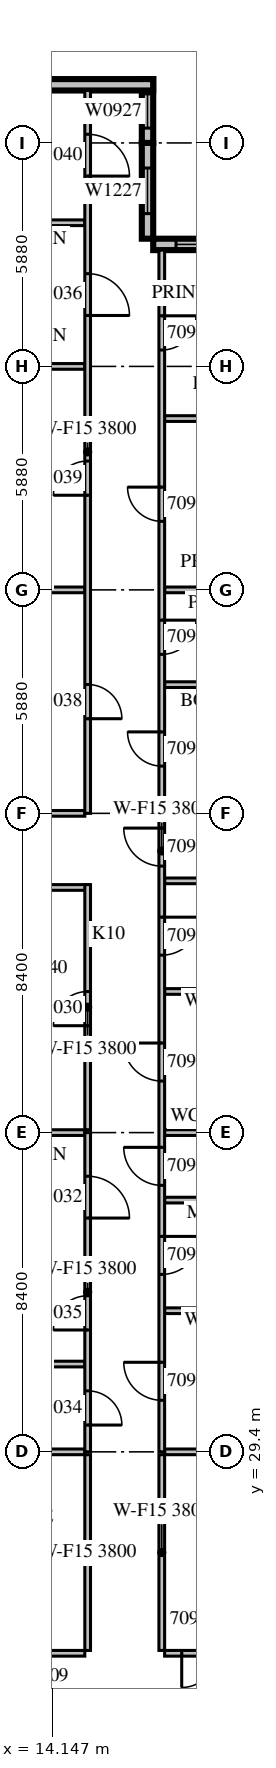
"""IFC4 building model, lengths in metres.
Left out: names, types, materials, properties, quantities, classifications, styles, units other than length and angle.
Written with IfcOpenShell. Run it as: python <this file> out.ifc"""

import sys

from ifc_helpers import new_model, si_unit, direction, frame, frame_2d, origin, place, context, subcontext, project, spatial, rectangle, extrude, source, transform, mapped, element, fill, save


model = new_model("IFC4")
c1 = context("Model", 3, precision=1e-05, world=origin(), true_north=direction((0.0, 1.0)))
c2 = subcontext(c1, "Body", "Model", "MODEL_VIEW")
j1 = project(units=[si_unit("LENGTHUNIT", "METRE"), si_unit("PLANEANGLEUNIT", "RADIAN")], contexts=[c1])
p1 = place(None, origin())
s1 = spatial("IfcSite", under=j1, at=p1, CompositionType="ELEMENT")
p2 = place(p1, origin())
s2 = spatial("IfcBuilding", under=s1, at=p2, CompositionType="ELEMENT")
p3 = place(p2, frame((0.0, 0.0, 48.9)))
s3 = spatial("IfcBuildingStorey", under=s2, at=p3, CompositionType="ELEMENT", Elevation=48.9)
m1 = source(origin(), c2, "Body", "SweptSolid", [
    extrude(rectangle(XDim=4.2, YDim=0.3, at=frame_2d((2.1, 0.0))), origin(), (0.0, 0.0, 1.0), 3.8),
])
p4 = place(p3, frame((21.0, 61.17, 0.0), z_axis=(0.0, 0.0, 1.0), x_axis=(-1.0, 0.0, 0.0)))
e1 = element("IfcWall", 1, at=p4, inside=s3, PredefinedType="STANDARD", context=c2, shape_type="MappedRepresentation", body=[
    mapped(m1, transform((0.0, 0.0, 0.0), scale=1.0)),
])
m2 = source(origin(), c2, "Body", "SweptSolid", [
    extrude(rectangle(XDim=3.0, YDim=2.7, at=frame_2d((1.5, 1.35))), frame((0.0, 0.16, 0.0), z_axis=(0.0, -1.0, 0.0), x_axis=(1.0, 0.0, 0.0)), (0.0, 0.0, 1.0), 0.32),
])
p5 = place(p4, frame((0.6, 0.0, 0.6)))
e2 = element("IfcOpeningElement", 2, at=p5, cuts=e1, PredefinedType="OPENING", context=c2, shape_type="MappedRepresentation", body=[
    mapped(m2, transform((0.0, 0.0, 0.0), scale=1.0)),
])
m3 = source(origin(), c2, "Body", "SweptSolid", [
    extrude(rectangle(XDim=2.52, YDim=0.3, at=frame_2d((1.26, 0.0))), origin(), (0.0, 0.0, 1.0), 3.8),
])
p6 = place(p3, frame((16.65, 61.32, 0.0), z_axis=(0.0, 0.0, 1.0), x_axis=(0.0, 1.0, 0.0)))
e3 = element("IfcWall", 3, at=p6, inside=s3, PredefinedType="STANDARD", context=c2, shape_type="MappedRepresentation", body=[
    mapped(m3, transform((0.0, 0.0, 0.0), scale=1.0)),
])
m4 = source(origin(), c2, "Body", "SweptSolid", [
    extrude(rectangle(XDim=1.2, YDim=2.7, at=frame_2d((0.6, 1.35))), frame((0.0, 0.16, 0.0), z_axis=(0.0, -1.0, 0.0), x_axis=(1.0, 0.0, 0.0)), (0.0, 0.0, 1.0), 0.32),
])
p7 = place(p6, frame((0.66, 0.0, 0.6)))
e4 = element("IfcOpeningElement", 4, at=p7, cuts=e3, PredefinedType="OPENING", context=c2, shape_type="MappedRepresentation", body=[
    mapped(m4, transform((0.0, 0.0, 0.0), scale=1.0)),
])
m5 = source(origin(), c2, "Body", "SweptSolid", [
    extrude(rectangle(XDim=1.68, YDim=0.3, at=frame_2d((0.84, 0.0))), origin(), (0.0, 0.0, 1.0), 3.8),
])
p8 = place(p3, frame((16.65, 63.84, 0.0), z_axis=(0.0, 0.0, 1.0), x_axis=(0.0, 1.0, 0.0)))
e5 = element("IfcWall", 5, at=p8, inside=s3, PredefinedType="STANDARD", context=c2, shape_type="MappedRepresentation", body=[
    mapped(m5, transform((0.0, 0.0, 0.0), scale=1.0)),
])
m6 = source(origin(), c2, "Body", "SweptSolid", [
    extrude(rectangle(XDim=0.9, YDim=2.7, at=frame_2d((0.45, 1.35))), frame((0.0, 0.16, 0.0), z_axis=(0.0, -1.0, 0.0), x_axis=(1.0, 0.0, 0.0)), (0.0, 0.0, 1.0), 0.32),
])
p9 = place(p8, frame((0.39, 0.0, 0.6)))
e6 = element("IfcOpeningElement", 6, at=p9, cuts=e5, PredefinedType="OPENING", context=c2, shape_type="MappedRepresentation", body=[
    mapped(m6, transform((0.0, 0.0, 0.0), scale=1.0)),
])
m7 = source(origin(), c2, "Body", "SweptSolid", [
    extrude(rectangle(XDim=3.15, YDim=0.3, at=frame_2d((1.575, 0.0))), origin(), (0.0, 0.0, 1.0), 3.8),
])
p10 = place(p3, frame((16.8, 65.37, 0.0), z_axis=(0.0, 0.0, 1.0), x_axis=(-1.0, 0.0, 0.0)))
e7 = element("IfcWall", 7, at=p10, inside=s3, PredefinedType="STANDARD", context=c2, shape_type="MappedRepresentation", body=[
    mapped(m7, transform((0.0, 0.0, 0.0), scale=1.0)),
])
m8 = source(origin(), c2, "Body", "SweptSolid", [
    extrude(rectangle(XDim=11.925, YDim=0.15, at=frame_2d((5.963, 0.0))), origin(), (0.0, 0.0, 1.0), 3.8),
])
p11 = place(p3, frame((3.075, 24.1, 0.0), z_axis=(0.0, 0.0, 1.0), x_axis=(1.0, 0.0, 0.0)))
e8 = element("IfcWall", 8, at=p11, inside=s3, PredefinedType="PARTITIONING", context=c2, shape_type="MappedRepresentation", body=[
    mapped(m8, transform((0.0, 0.0, 0.0), scale=1.0)),
])
m9 = source(origin(), c2, "Body", "SweptSolid", [
    extrude(rectangle(XDim=0.9, YDim=2.1, at=frame_2d((0.45, 1.05))), frame((0.0, 0.085, 0.0), z_axis=(0.0, -1.0, 0.0), x_axis=(1.0, 0.0, 0.0)), (0.0, 0.0, 1.0), 0.17),
])
p12 = place(p11, frame((1.462, 0.0, 0.0)))
e9 = element("IfcOpeningElement", 9, at=p12, cuts=e8, PredefinedType="OPENING", context=c2, shape_type="MappedRepresentation", body=[
    mapped(m9, transform((0.0, 0.0, 0.0), scale=1.0)),
])
p13 = place(p11, frame((8.3, 0.0, 0.0)))
e10 = element("IfcOpeningElement", 10, at=p13, cuts=e8, PredefinedType="OPENING", context=c2, shape_type="MappedRepresentation", body=[
    mapped(m9, transform((0.0, 0.0, 0.0), scale=1.0)),
])
m10 = source(origin(), c2, "Body", "SweptSolid", [
    extrude(rectangle(XDim=3.6, YDim=0.15, at=frame_2d((1.8, 0.0))), origin(), (0.0, 0.0, 1.0), 3.8),
])
p14 = place(p3, frame((17.1, 24.1, 0.0), z_axis=(0.0, 0.0, 1.0), x_axis=(1.0, 0.0, 0.0)))
e11 = element("IfcWall", 11, at=p14, inside=s3, PredefinedType="PARTITIONING", context=c2, shape_type="MappedRepresentation", body=[
    mapped(m10, transform((0.0, 0.0, 0.0), scale=1.0)),
])
p15 = place(p14, frame((0.45, 0.0, 0.0)))
e12 = element("IfcOpeningElement", 12, at=p15, cuts=e11, PredefinedType="OPENING", context=c2, shape_type="MappedRepresentation", body=[
    mapped(m9, transform((0.0, 0.0, 0.0), scale=1.0)),
])
m11 = source(origin(), c2, "Body", "SweptSolid", [
    extrude(rectangle(XDim=5.15, YDim=0.15, at=frame_2d((2.575, 0.0))), origin(), (0.0, 0.0, 1.0), 3.8),
])
for number, where, z_axis, x_axis in (
    (13, (15.075, 24.175, 0.0), (0.0, 0.0, 1.0), (0.0, 1.0, 0.0)),
    (14, (17.025, 29.325, 0.0), (0.0, 0.0, 1.0), (0.0, -1.0, 0.0)),
):
    element("IfcWall", number, at=place(p3, frame(where, z_axis=z_axis, x_axis=x_axis)), inside=s3, PredefinedType="PARTITIONING", context=c2, shape_type="MappedRepresentation", body=[
        mapped(m11, transform((0.0, 0.0, 0.0), scale=1.0)),
    ])
m12 = source(origin(), c2, "Body", "SweptSolid", [
    extrude(rectangle(XDim=3.901, YDim=0.15, at=frame_2d((1.95, 0.0))), origin(), (0.0, 0.0, 1.0), 3.8),
])
p16 = place(p3, frame((15.0, 29.4, 0.0), z_axis=(0.0, 0.0, 1.0), x_axis=(-1.0, 0.0, 0.0)))
e15 = element("IfcWall", 15, at=p16, inside=s3, PredefinedType="PARTITIONING", context=c2, shape_type="MappedRepresentation", body=[
    mapped(m12, transform((0.0, 0.0, 0.0), scale=1.0)),
])
m13 = source(origin(), c2, "Body", "SweptSolid", [
    extrude(rectangle(XDim=2.701, YDim=0.15, at=frame_2d((1.351, 0.0))), origin(), (0.0, 0.0, 1.0), 3.8),
])
p17 = place(p3, frame((19.801, 29.4, 0.0), z_axis=(0.0, 0.0, 1.0), x_axis=(-1.0, 0.0, 0.0)))
e16 = element("IfcWall", 16, at=p17, inside=s3, PredefinedType="PARTITIONING", context=c2, shape_type="MappedRepresentation", body=[
    mapped(m13, transform((0.0, 0.0, 0.0), scale=1.0)),
])
p18 = place(p3, frame((15.075, 44.25, 0.0), z_axis=(0.0, 0.0, 1.0), x_axis=(-1.0, 0.0, 0.0)))
e17 = element("IfcWall", 17, at=p18, inside=s3, PredefinedType="PARTITIONING", context=c2, shape_type="SweptSolid", body=[
    extrude(rectangle(XDim=3.175, YDim=0.15, at=frame_2d((1.587, 0.0))), origin(), (0.0, 0.0, 1.0), 3.8),
])
m14 = source(origin(), c2, "Body", "SweptSolid", [
    extrude(rectangle(XDim=6.45, YDim=0.15, at=frame_2d((3.225, 0.0))), origin(), (0.0, 0.0, 1.0), 3.8),
])
p19 = place(p3, frame((15.075, 37.875, 0.0), z_axis=(0.0, 0.0, 1.0), x_axis=(0.0, 1.0, 0.0)))
e18 = element("IfcWall", 18, at=p19, inside=s3, PredefinedType="PARTITIONING", context=c2, shape_type="MappedRepresentation", body=[
    mapped(m14, transform((0.0, 0.0, 0.0), scale=1.0)),
])
p20 = place(p19, frame((2.737, 0.0, 0.0)))
e19 = element("IfcOpeningElement", 19, at=p20, cuts=e18, PredefinedType="OPENING", context=c2, shape_type="MappedRepresentation", body=[
    mapped(m9, transform((0.0, 0.0, 0.0), scale=1.0)),
])
m15 = source(origin(), c2, "Body", "SweptSolid", [
    extrude(rectangle(XDim=3.75, YDim=0.15, at=frame_2d((1.875, 0.0))), origin(), (0.0, 0.0, 1.0), 3.8),
])
for number, where, z_axis, x_axis in (
    (20, (15.0, 31.71, 0.0), (0.0, 0.0, 1.0), (-1.0, 0.0, 0.0)),
    (21, (15.0, 34.403, 0.0), (0.0, 0.0, 1.0), (-1.0, 0.0, 0.0)),
    (22, (15.0, 37.8, 0.0), (0.0, 0.0, 1.0), (-1.0, 0.0, 0.0)),
    (23, (15.0, 52.08, 0.0), (0.0, 0.0, 1.0), (-1.0, 0.0, 0.0)),
    (24, (15.0, 57.96, 0.0), (0.0, 0.0, 1.0), (-1.0, 0.0, 0.0)),
    (25, (15.0, 46.2, 0.0), (0.0, 0.0, 1.0), (-1.0, 0.0, 0.0)),
    (26, (15.0, 61.74, 0.0), (0.0, 0.0, 1.0), (-1.0, 0.0, 0.0)),
):
    element("IfcWall", number, at=place(p3, frame(where, z_axis=z_axis, x_axis=x_axis)), inside=s3, PredefinedType="PARTITIONING", context=c2, shape_type="MappedRepresentation", body=[
        mapped(m15, transform((0.0, 0.0, 0.0), scale=1.0)),
    ])
for number, where, z_axis, x_axis in (
    (27, (17.1, 33.113, 0.0), (0.0, 0.0, 1.0), (1.0, 0.0, 0.0)),
    (28, (17.1, 36.024, 0.0), (0.0, 0.0, 1.0), (1.0, 0.0, 0.0)),
    (29, (17.1, 41.513, 0.0), (0.0, 0.0, 1.0), (1.0, 0.0, 0.0)),
    (30, (17.1, 44.424, 0.0), (0.0, 0.0, 1.0), (1.0, 0.0, 0.0)),
    (31, (17.1, 49.587, 0.0), (0.0, 0.0, 1.0), (1.0, 0.0, 0.0)),
    (32, (17.1, 56.587, 0.0), (0.0, 0.0, 1.0), (1.0, 0.0, 0.0)),
):
    element("IfcWall", number, at=place(p3, frame(where, z_axis=z_axis, x_axis=x_axis)), inside=s3, PredefinedType="PARTITIONING", context=c2, shape_type="MappedRepresentation", body=[
        mapped(m10, transform((0.0, 0.0, 0.0), scale=1.0)),
    ])
for number, where, z_axis, x_axis in (
    (33, (19.801, 37.8, 0.0), (0.0, 0.0, 1.0), (-1.0, 0.0, 0.0)),
    (34, (19.801, 46.2, 0.0), (0.0, 0.0, 1.0), (-1.0, 0.0, 0.0)),
    (35, (19.801, 52.08, 0.0), (0.0, 0.0, 1.0), (-1.0, 0.0, 0.0)),
):
    element("IfcWall", number, at=place(p3, frame(where, z_axis=z_axis, x_axis=x_axis)), inside=s3, PredefinedType="PARTITIONING", context=c2, shape_type="MappedRepresentation", body=[
        mapped(m13, transform((0.0, 0.0, 0.0), scale=1.0)),
    ])
m16 = source(origin(), c2, "Body", "SweptSolid", [
    extrude(rectangle(XDim=8.4, YDim=0.15, at=frame_2d((4.2, 0.0))), origin(), (0.0, 0.0, 1.0), 3.8),
])
p21 = place(p3, frame((15.075, 29.4, 0.0), z_axis=(0.0, 0.0, 1.0), x_axis=(0.0, 1.0, 0.0)))
e36 = element("IfcWall", 36, at=p21, inside=s3, PredefinedType="PARTITIONING", context=c2, shape_type="MappedRepresentation", body=[
    mapped(m16, transform((0.0, 0.0, 0.0), scale=1.0)),
])
m17 = source(origin(), c2, "Body", "SweptSolid", [
    extrude(rectangle(XDim=1.1, YDim=2.1, at=frame_2d((0.55, 1.05))), frame((0.0, 0.085, 0.0), z_axis=(0.0, -1.0, 0.0), x_axis=(1.0, 0.0, 0.0)), (0.0, 0.0, 1.0), 0.17),
])
p22 = place(p21, frame((6.152, 0.0, 0.0)))
e37 = element("IfcOpeningElement", 37, at=p22, cuts=e36, PredefinedType="OPENING", context=c2, shape_type="MappedRepresentation", body=[
    mapped(m17, transform((0.0, 0.0, 0.0), scale=1.0)),
])
p23 = place(p21, frame((0.705, 0.0, 0.0)))
e38 = element("IfcOpeningElement", 38, at=p23, cuts=e36, PredefinedType="OPENING", context=c2, shape_type="MappedRepresentation", body=[
    mapped(m9, transform((0.0, 0.0, 0.0), scale=1.0)),
])
p24 = place(p21, frame((3.207, 0.0, 0.0)))
e39 = element("IfcOpeningElement", 39, at=p24, cuts=e36, PredefinedType="OPENING", context=c2, shape_type="MappedRepresentation", body=[
    mapped(m9, transform((0.0, 0.0, 0.0), scale=1.0)),
])
m18 = source(origin(), c2, "Body", "SweptSolid", [
    extrude(rectangle(XDim=19.02, YDim=0.15, at=frame_2d((9.51, 0.0))), origin(), (0.0, 0.0, 1.0), 3.8),
])
p25 = place(p3, frame((15.075, 46.2, 0.0), z_axis=(0.0, 0.0, 1.0), x_axis=(0.0, 1.0, 0.0)))
e40 = element("IfcWall", 40, at=p25, inside=s3, PredefinedType="PARTITIONING", context=c2, shape_type="MappedRepresentation", body=[
    mapped(m18, transform((0.0, 0.0, 0.0), scale=1.0)),
])
p26 = place(p25, frame((13.1, 0.0, 0.0)))
e41 = element("IfcOpeningElement", 41, at=p26, cuts=e40, PredefinedType="OPENING", context=c2, shape_type="MappedRepresentation", body=[
    mapped(m17, transform((0.0, 0.0, 0.0), scale=1.0)),
])
p27 = place(p25, frame((2.49, 0.0, 0.0)))
e42 = element("IfcOpeningElement", 42, at=p27, cuts=e40, PredefinedType="OPENING", context=c2, shape_type="MappedRepresentation", body=[
    mapped(m9, transform((0.0, 0.0, 0.0), scale=1.0)),
])
p28 = place(p25, frame((8.37, 0.0, 0.0)))
e43 = element("IfcOpeningElement", 43, at=p28, cuts=e40, PredefinedType="OPENING", context=c2, shape_type="MappedRepresentation", body=[
    mapped(m9, transform((0.0, 0.0, 0.0), scale=1.0)),
])
p29 = place(p25, frame((16.767, 0.0, 0.0)))
e44 = element("IfcOpeningElement", 44, at=p29, cuts=e40, PredefinedType="OPENING", context=c2, shape_type="MappedRepresentation", body=[
    mapped(m17, transform((0.0, 0.0, 0.0), scale=1.0)),
])
p30 = place(p3, frame((17.025, 61.02, 0.0), z_axis=(0.0, 0.0, 1.0), x_axis=(0.0, -1.0, 0.0)))
e45 = element("IfcWall", 45, at=p30, inside=s3, PredefinedType="PARTITIONING", context=c2, shape_type="SweptSolid", body=[
    extrude(rectangle(XDim=31.62, YDim=0.15, at=frame_2d((15.81, 0.0))), origin(), (0.0, 0.0, 1.0), 3.8),
])
m19 = source(origin(), c2, "Body", "SweptSolid", [
    extrude(rectangle(XDim=1.0, YDim=2.1, at=frame_2d((0.5, 1.05))), frame((0.0, 0.085, 0.0), z_axis=(0.0, -1.0, 0.0), x_axis=(1.0, 0.0, 0.0)), (0.0, 0.0, 1.0), 0.17),
])
p31 = place(p30, frame((29.263, 0.0, 0.0)))
e46 = element("IfcOpeningElement", 46, at=p31, cuts=e45, PredefinedType="OPENING", context=c2, shape_type="MappedRepresentation", body=[
    mapped(m19, transform((0.0, 0.0, 0.0), scale=1.0)),
])
p32 = place(p30, frame((25.951, 0.0, 0.0)))
e47 = element("IfcOpeningElement", 47, at=p32, cuts=e45, PredefinedType="OPENING", context=c2, shape_type="MappedRepresentation", body=[
    mapped(m19, transform((0.0, 0.0, 0.0), scale=1.0)),
])
p33 = place(p30, frame((23.608, 0.0, 0.0)))
e48 = element("IfcOpeningElement", 48, at=p33, cuts=e45, PredefinedType="OPENING", context=c2, shape_type="MappedRepresentation", body=[
    mapped(m19, transform((0.0, 0.0, 0.0), scale=1.0)),
])
p34 = place(p30, frame((20.863, 0.0, 0.0)))
e49 = element("IfcOpeningElement", 49, at=p34, cuts=e45, PredefinedType="OPENING", context=c2, shape_type="MappedRepresentation", body=[
    mapped(m19, transform((0.0, 0.0, 0.0), scale=1.0)),
])
p35 = place(p30, frame((17.551, 0.0, 0.0)))
e50 = element("IfcOpeningElement", 50, at=p35, cuts=e45, PredefinedType="OPENING", context=c2, shape_type="MappedRepresentation", body=[
    mapped(m19, transform((0.0, 0.0, 0.0), scale=1.0)),
])
p36 = place(p30, frame((15.208, 0.0, 0.0)))
e51 = element("IfcOpeningElement", 51, at=p36, cuts=e45, PredefinedType="OPENING", context=c2, shape_type="MappedRepresentation", body=[
    mapped(m19, transform((0.0, 0.0, 0.0), scale=1.0)),
])
p37 = place(p30, frame((12.677, 0.0, 0.0)))
e52 = element("IfcOpeningElement", 52, at=p37, cuts=e45, PredefinedType="OPENING", context=c2, shape_type="MappedRepresentation", body=[
    mapped(m9, transform((0.0, 0.0, 0.0), scale=1.0)),
])
p38 = place(p30, frame((9.737, 0.0, 0.0)))
e53 = element("IfcOpeningElement", 53, at=p38, cuts=e45, PredefinedType="OPENING", context=c2, shape_type="MappedRepresentation", body=[
    mapped(m9, transform((0.0, 0.0, 0.0), scale=1.0)),
])
p39 = place(p30, frame((6.236, 0.0, 0.0)))
e54 = element("IfcOpeningElement", 54, at=p39, cuts=e45, PredefinedType="OPENING", context=c2, shape_type="MappedRepresentation", body=[
    mapped(m9, transform((0.0, 0.0, 0.0), scale=1.0)),
])
p40 = place(p30, frame((1.729, 0.0, 0.0)))
e55 = element("IfcOpeningElement", 55, at=p40, cuts=e45, PredefinedType="OPENING", context=c2, shape_type="MappedRepresentation", body=[
    mapped(m9, transform((0.0, 0.0, 0.0), scale=1.0)),
])
m20 = source(origin(), c2, "Body", "SweptSolid", [
    extrude(rectangle(XDim=3.0, YDim=2.7, at=frame_2d((1.5, 1.35))), frame((0.0, 0.03, 0.0), z_axis=(0.0, -1.0, 0.0), x_axis=(1.0, 0.0, 0.0)), (0.0, 0.0, 1.0), 0.06),
])
p41 = place(p5, origin())
e56 = element("IfcWindow", 56, at=p41, inside=s3, PartitioningType="SINGLE_PANEL", PredefinedType="WINDOW", context=c2, shape_type="MappedRepresentation", body=[
    mapped(m20, transform((0.0, 0.0, 0.0), scale=1.0)),
])
fill(e2, e56)
m21 = source(origin(), c2, "Body", "SweptSolid", [
    extrude(rectangle(XDim=1.2, YDim=2.7, at=frame_2d((0.6, 1.35))), frame((0.0, 0.03, 0.0), z_axis=(0.0, -1.0, 0.0), x_axis=(1.0, 0.0, 0.0)), (0.0, 0.0, 1.0), 0.06),
])
p42 = place(p7, origin())
e57 = element("IfcWindow", 57, at=p42, inside=s3, PartitioningType="SINGLE_PANEL", PredefinedType="WINDOW", context=c2, shape_type="MappedRepresentation", body=[
    mapped(m21, transform((0.0, 0.0, 0.0), scale=1.0)),
])
fill(e4, e57)
m22 = source(origin(), c2, "Body", "SweptSolid", [
    extrude(rectangle(XDim=0.9, YDim=2.7, at=frame_2d((0.45, 1.35))), frame((0.0, 0.03, 0.0), z_axis=(0.0, -1.0, 0.0), x_axis=(1.0, 0.0, 0.0)), (0.0, 0.0, 1.0), 0.06),
])
p43 = place(p9, origin())
e58 = element("IfcWindow", 58, at=p43, inside=s3, PartitioningType="SINGLE_PANEL", PredefinedType="WINDOW", context=c2, shape_type="MappedRepresentation", body=[
    mapped(m22, transform((0.0, 0.0, 0.0), scale=1.0)),
])
fill(e6, e58)
m23 = source(origin(), c2, "Body", "SweptSolid", [
    extrude(rectangle(XDim=0.9, YDim=2.1, at=frame_2d((0.45, 1.05))), frame((0.0, 0.025, 0.0), z_axis=(0.0, -1.0, 0.0), x_axis=(1.0, 0.0, 0.0)), (0.0, 0.0, 1.0), 0.05),
])
p44 = place(p15, origin())
e59 = element("IfcDoor", 59, at=p44, inside=s3, OperationType="SINGLE_SWING_RIGHT", PredefinedType="DOOR", context=c2, shape_type="MappedRepresentation", body=[
    mapped(m23, transform((0.0, 0.0, 0.0), scale=1.0)),
])
fill(e12, e59)
p45 = place(p20, origin())
e60 = element("IfcDoor", 60, at=p45, inside=s3, OperationType="SINGLE_SWING_LEFT", PredefinedType="DOOR", context=c2, shape_type="MappedRepresentation", body=[
    mapped(m23, transform((0.0, 0.0, 0.0), scale=1.0)),
])
fill(e19, e60)
m24 = source(origin(), c2, "Body", "SweptSolid", [
    extrude(rectangle(XDim=1.1, YDim=2.1, at=frame_2d((0.55, 1.05))), frame((0.0, 0.025, 0.0), z_axis=(0.0, -1.0, 0.0), x_axis=(1.0, 0.0, 0.0)), (0.0, 0.0, 1.0), 0.05),
])
p46 = place(p22, origin())
e61 = element("IfcDoor", 61, at=p46, inside=s3, OperationType="SINGLE_SWING_RIGHT", PredefinedType="DOOR", context=c2, shape_type="MappedRepresentation", body=[
    mapped(m24, transform((0.0, 0.0, 0.0), scale=1.0)),
])
fill(e37, e61)
p47 = place(p23, origin())
e62 = element("IfcDoor", 62, at=p47, inside=s3, OperationType="SINGLE_SWING_RIGHT", PredefinedType="DOOR", context=c2, shape_type="MappedRepresentation", body=[
    mapped(m23, transform((0.0, 0.0, 0.0), scale=1.0)),
])
fill(e38, e62)
p48 = place(p24, origin())
e63 = element("IfcDoor", 63, at=p48, inside=s3, OperationType="SINGLE_SWING_LEFT", PredefinedType="DOOR", context=c2, shape_type="MappedRepresentation", body=[
    mapped(m23, transform((0.0, 0.0, 0.0), scale=1.0)),
])
fill(e39, e63)
p49 = place(p26, origin())
e64 = element("IfcDoor", 64, at=p49, inside=s3, OperationType="SINGLE_SWING_RIGHT", PredefinedType="DOOR", context=c2, shape_type="MappedRepresentation", body=[
    mapped(m24, transform((0.0, 0.0, 0.0), scale=1.0)),
])
fill(e41, e64)
p50 = place(p27, origin())
e65 = element("IfcDoor", 65, at=p50, inside=s3, OperationType="SINGLE_SWING_RIGHT", PredefinedType="DOOR", context=c2, shape_type="MappedRepresentation", body=[
    mapped(m23, transform((0.0, 0.0, 0.0), scale=1.0)),
])
fill(e42, e65)
p51 = place(p28, origin())
e66 = element("IfcDoor", 66, at=p51, inside=s3, OperationType="SINGLE_SWING_LEFT", PredefinedType="DOOR", context=c2, shape_type="MappedRepresentation", body=[
    mapped(m23, transform((0.0, 0.0, 0.0), scale=1.0)),
])
fill(e43, e66)
p52 = place(p29, origin())
e67 = element("IfcDoor", 67, at=p52, inside=s3, OperationType="SINGLE_SWING_RIGHT", PredefinedType="DOOR", context=c2, shape_type="MappedRepresentation", body=[
    mapped(m24, transform((0.0, 0.0, 0.0), scale=1.0)),
])
fill(e44, e67)
m25 = source(origin(), c2, "Body", "SweptSolid", [
    extrude(rectangle(XDim=1.0, YDim=2.1, at=frame_2d((0.5, 1.05))), frame((0.0, 0.025, 0.0), z_axis=(0.0, -1.0, 0.0), x_axis=(1.0, 0.0, 0.0)), (0.0, 0.0, 1.0), 0.05),
])
p53 = place(p31, origin())
e68 = element("IfcDoor", 68, at=p53, inside=s3, OperationType="SINGLE_SWING_RIGHT", PredefinedType="DOOR", context=c2, shape_type="MappedRepresentation", body=[
    mapped(m25, transform((0.0, 0.0, 0.0), scale=1.0)),
])
fill(e46, e68)
p54 = place(p32, origin())
e69 = element("IfcDoor", 69, at=p54, inside=s3, OperationType="SINGLE_SWING_LEFT", PredefinedType="DOOR", context=c2, shape_type="MappedRepresentation", body=[
    mapped(m25, transform((0.0, 0.0, 0.0), scale=1.0)),
])
fill(e47, e69)
p55 = place(p33, origin())
e70 = element("IfcDoor", 70, at=p55, inside=s3, OperationType="SINGLE_SWING_RIGHT", PredefinedType="DOOR", context=c2, shape_type="MappedRepresentation", body=[
    mapped(m25, transform((0.0, 0.0, 0.0), scale=1.0)),
])
fill(e48, e70)
p56 = place(p34, origin())
e71 = element("IfcDoor", 71, at=p56, inside=s3, OperationType="SINGLE_SWING_RIGHT", PredefinedType="DOOR", context=c2, shape_type="MappedRepresentation", body=[
    mapped(m25, transform((0.0, 0.0, 0.0), scale=1.0)),
])
fill(e49, e71)
p57 = place(p35, origin())
e72 = element("IfcDoor", 72, at=p57, inside=s3, OperationType="SINGLE_SWING_LEFT", PredefinedType="DOOR", context=c2, shape_type="MappedRepresentation", body=[
    mapped(m25, transform((0.0, 0.0, 0.0), scale=1.0)),
])
fill(e50, e72)
p58 = place(p36, origin())
e73 = element("IfcDoor", 73, at=p58, inside=s3, OperationType="SINGLE_SWING_RIGHT", PredefinedType="DOOR", context=c2, shape_type="MappedRepresentation", body=[
    mapped(m25, transform((0.0, 0.0, 0.0), scale=1.0)),
])
fill(e51, e73)
p59 = place(p37, origin())
e74 = element("IfcDoor", 74, at=p59, inside=s3, OperationType="SINGLE_SWING_RIGHT", PredefinedType="DOOR", context=c2, shape_type="MappedRepresentation", body=[
    mapped(m23, transform((0.0, 0.0, 0.0), scale=1.0)),
])
fill(e52, e74)
p60 = place(p38, origin())
e75 = element("IfcDoor", 75, at=p60, inside=s3, OperationType="SINGLE_SWING_LEFT", PredefinedType="DOOR", context=c2, shape_type="MappedRepresentation", body=[
    mapped(m23, transform((0.0, 0.0, 0.0), scale=1.0)),
])
fill(e53, e75)
p61 = place(p39, origin())
e76 = element("IfcDoor", 76, at=p61, inside=s3, OperationType="SINGLE_SWING_RIGHT", PredefinedType="DOOR", context=c2, shape_type="MappedRepresentation", body=[
    mapped(m23, transform((0.0, 0.0, 0.0), scale=1.0)),
])
fill(e54, e76)
p62 = place(p40, origin())
e77 = element("IfcDoor", 77, at=p62, inside=s3, OperationType="SINGLE_SWING_LEFT", PredefinedType="DOOR", context=c2, shape_type="MappedRepresentation", body=[
    mapped(m23, transform((0.0, 0.0, 0.0), scale=1.0)),
])
fill(e55, e77)
save(model, sys.argv[1])
